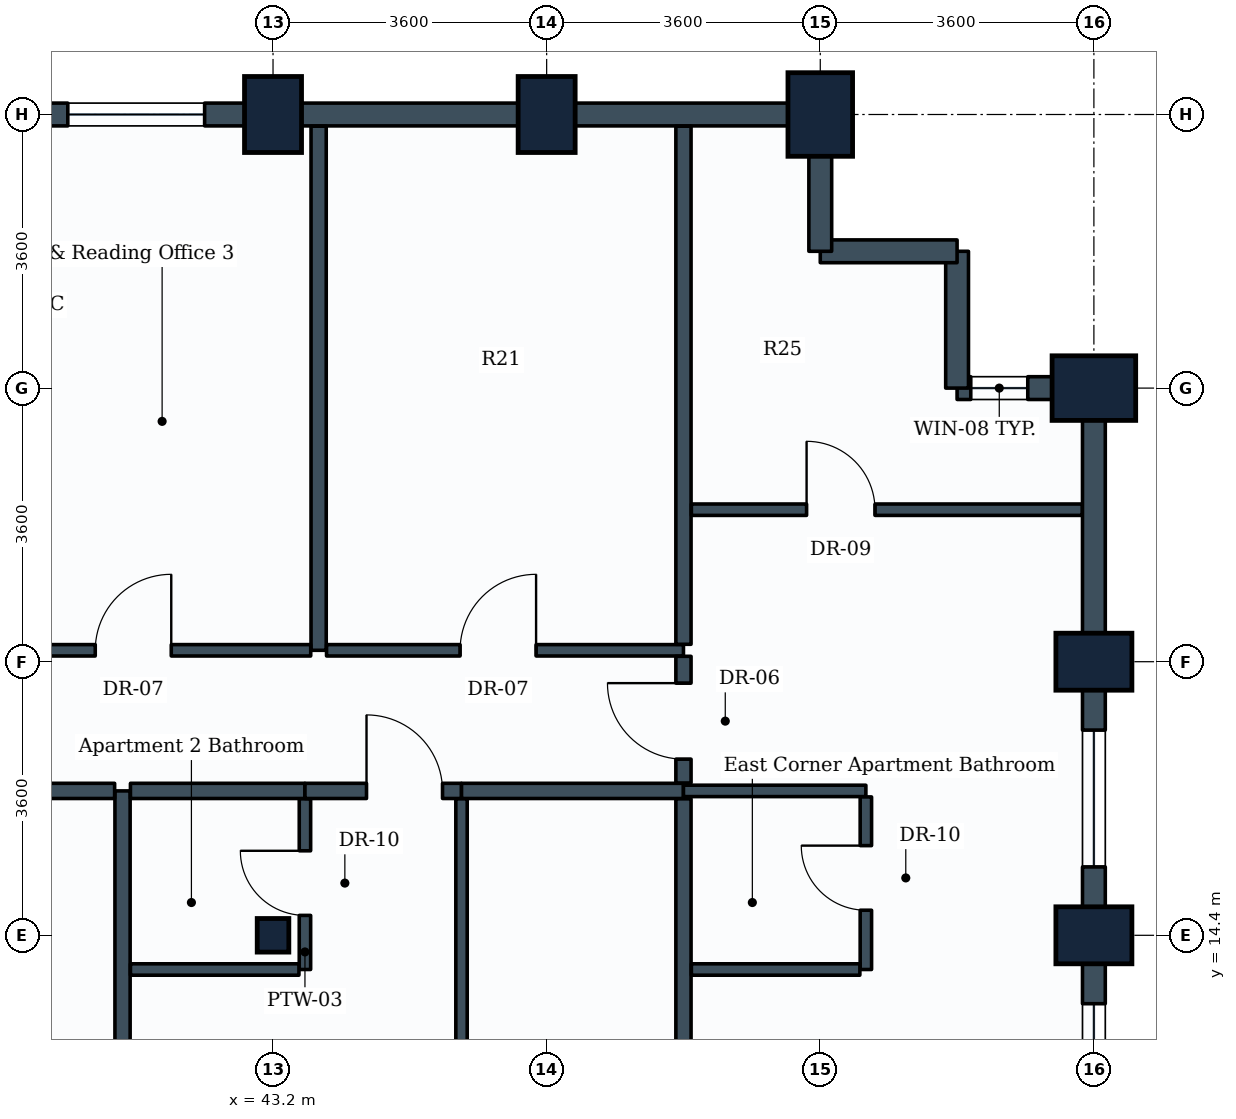
"""IFC4 building model, lengths in metres.
Left out: names, types, materials, properties, quantities, classifications, styles, units other than length and angle.
Written with IfcOpenShell. Run it as: python <this file> out.ifc"""

import sys

from ifc_helpers import new_model, si_unit, direction, frame, frame_2d, origin, origin_2d, place, context, subcontext, project, spatial, rectangle, i_section, extrude, element, fill, save


model = new_model("IFC4")
c1 = context("Model", 3, precision=1e-05, world=origin(), true_north=direction((0.0, 1.0)))
c2 = subcontext(c1, "Body", "Model", "MODEL_VIEW")
j1 = project(units=[si_unit("LENGTHUNIT", "METRE"), si_unit("PLANEANGLEUNIT", "RADIAN")], contexts=[c1])
p1 = place(None, origin())
s1 = spatial("IfcSite", under=j1, at=p1, CompositionType="ELEMENT")
p2 = place(p1, origin())
s2 = spatial("IfcBuilding", under=s1, at=p2, CompositionType="ELEMENT")
p3 = place(p2, frame((0.0, 0.0, 135.2)))
s3 = spatial("IfcBuildingStorey", under=s2, at=p3, CompositionType="ELEMENT", Elevation=135.2)
p4 = place(p3, frame((43.2, 14.4, 0.0), z_axis=(0.0, 0.0, 1.0), x_axis=(1.0, 0.0, 0.0)))
e1 = element("IfcColumn", 1, at=p4, inside=s3, PredefinedType="COLUMN", context=c2, shape_type="SweptSolid", body=[
    extrude(i_section(OverallWidth=0.416, OverallDepth=0.442, WebThickness=0.025, FlangeThickness=0.041, FilletRadius=0.015, at=origin_2d()), origin(), (0.0, 0.0, 1.0), 3.8),
])
for number, where, z_axis, x_axis in (
    (2, (43.2, 25.2, 0.0), (0.0, 0.0, 1.0), (1.0, 0.0, 0.0)),
    (3, (46.8, 25.2, 0.0), (0.0, 0.0, 1.0), (1.0, 0.0, 0.0)),
):
    element("IfcColumn", number, at=place(p3, frame(where, z_axis=z_axis, x_axis=x_axis)), inside=s3, PredefinedType="COLUMN", context=c2, shape_type="SweptSolid", body=[
        extrude(rectangle(XDim=0.75, YDim=1.0, at=origin_2d()), origin(), (0.0, 0.0, 1.0), 3.8),
    ])
p5 = place(p3, frame((50.4, 25.2, 0.0), z_axis=(0.0, 0.0, 1.0), x_axis=(1.0, 0.0, 0.0)))
e4 = element("IfcColumn", 4, at=p5, inside=s3, PredefinedType="COLUMN", context=c2, shape_type="SweptSolid", body=[
    extrude(rectangle(XDim=0.85, YDim=1.1, at=origin_2d()), origin(), (0.0, 0.0, 1.0), 3.8),
])
for number, where, z_axis, x_axis in (
    (5, (54.0, 14.4, 0.0), (0.0, 0.0, 1.0), (0.0, 1.0, 0.0)),
    (6, (54.0, 18.0, 0.0), (0.0, 0.0, 1.0), (0.0, 1.0, 0.0)),
):
    element("IfcColumn", number, at=place(p3, frame(where, z_axis=z_axis, x_axis=x_axis)), inside=s3, PredefinedType="COLUMN", context=c2, shape_type="SweptSolid", body=[
        extrude(rectangle(XDim=0.75, YDim=1.0, at=origin_2d()), origin(), (0.0, 0.0, 1.0), 3.8),
    ])
p6 = place(p3, frame((54.0, 21.6, 0.0), z_axis=(0.0, 0.0, 1.0), x_axis=(0.0, 1.0, 0.0)))
e7 = element("IfcColumn", 7, at=p6, inside=s3, PredefinedType="COLUMN", context=c2, shape_type="SweptSolid", body=[
    extrude(rectangle(XDim=0.85, YDim=1.1, at=origin_2d()), origin(), (0.0, 0.0, 1.0), 3.8),
])
p7 = place(p3, frame((54.0, 14.4, 0.0), z_axis=(0.0, 0.0, 1.0), x_axis=(0.0, -1.0, 0.0)))
e8 = element("IfcWall", 8, at=p7, inside=s3, PredefinedType="STANDARD", context=c2, shape_type="SweptSolid", body=[
    extrude(rectangle(XDim=3.6, YDim=0.3, at=frame_2d((1.8, 0.0))), origin(), (0.0, 0.0, 1.0), 2.93),
])
p8 = place(p7, frame((0.9, 0.0, 0.85)))
e9 = element("IfcOpeningElement", 9, at=p8, cuts=e8, PredefinedType="OPENING", context=c2, shape_type="SweptSolid", body=[
    extrude(rectangle(XDim=1.8, YDim=1.35, at=frame_2d((0.9, 0.675))), frame((0.0, 0.16, 0.0), z_axis=(0.0, -1.0, 0.0), x_axis=(1.0, 0.0, 0.0)), (0.0, 0.0, 1.0), 0.32),
])
p9 = place(p3, frame((54.0, 18.0, 0.0), z_axis=(0.0, 0.0, 1.0), x_axis=(0.0, -1.0, 0.0)))
e10 = element("IfcWall", 10, at=p9, inside=s3, PredefinedType="STANDARD", context=c2, shape_type="SweptSolid", body=[
    extrude(rectangle(XDim=3.6, YDim=0.3, at=frame_2d((1.8, 0.0))), origin(), (0.0, 0.0, 1.0), 2.93),
])
p10 = place(p9, frame((0.9, 0.0, 0.85)))
e11 = element("IfcOpeningElement", 11, at=p10, cuts=e10, PredefinedType="OPENING", context=c2, shape_type="SweptSolid", body=[
    extrude(rectangle(XDim=1.8, YDim=1.35, at=frame_2d((0.9, 0.675))), frame((0.0, 0.16, 0.0), z_axis=(0.0, -1.0, 0.0), x_axis=(1.0, 0.0, 0.0)), (0.0, 0.0, 1.0), 0.32),
])
p11 = place(p3, frame((54.0, 21.6, 0.0), z_axis=(0.0, 0.0, 1.0), x_axis=(0.0, -1.0, 0.0)))
e12 = element("IfcWall", 12, at=p11, inside=s3, PredefinedType="STANDARD", context=c2, shape_type="SweptSolid", body=[
    extrude(rectangle(XDim=3.6, YDim=0.3, at=frame_2d((1.8, 0.0))), origin(), (0.0, 0.0, 1.0), 2.93),
])
p12 = place(p3, frame((52.2, 21.6, 0.0), z_axis=(0.0, 0.0, 1.0), x_axis=(1.0, 0.0, 0.0)))
e13 = element("IfcWall", 13, at=p12, inside=s3, PredefinedType="STANDARD", context=c2, shape_type="SweptSolid", body=[
    extrude(rectangle(XDim=1.8, YDim=0.3, at=frame_2d((0.9, 0.0))), origin(), (0.0, 0.0, 1.0), 2.93),
])
p13 = place(p12, frame((0.18, 0.0, 0.85)))
e14 = element("IfcOpeningElement", 14, at=p13, cuts=e13, PredefinedType="OPENING", context=c2, shape_type="SweptSolid", body=[
    extrude(rectangle(XDim=0.75, YDim=1.05, at=frame_2d((0.375, 0.525))), frame((0.0, 0.16, 0.0), z_axis=(0.0, -1.0, 0.0), x_axis=(1.0, 0.0, 0.0)), (0.0, 0.0, 1.0), 0.32),
])
p14 = place(p3, frame((52.2, 23.4, 0.0), z_axis=(0.0, 0.0, 1.0), x_axis=(0.0, -1.0, 0.0)))
e15 = element("IfcWall", 15, at=p14, inside=s3, PredefinedType="STANDARD", context=c2, shape_type="SweptSolid", body=[
    extrude(rectangle(XDim=1.8, YDim=0.3, at=frame_2d((0.9, 0.0))), origin(), (0.0, 0.0, 1.0), 3.535),
])
p15 = place(p3, frame((50.4, 23.4, 0.0), z_axis=(0.0, 0.0, 1.0), x_axis=(1.0, 0.0, 0.0)))
e16 = element("IfcWall", 16, at=p15, inside=s3, PredefinedType="STANDARD", context=c2, shape_type="SweptSolid", body=[
    extrude(rectangle(XDim=1.8, YDim=0.3, at=frame_2d((0.9, 0.0))), origin(), (0.0, 0.0, 1.0), 3.535),
])
p16 = place(p3, frame((50.4, 25.2, 0.0), z_axis=(0.0, 0.0, 1.0), x_axis=(0.0, -1.0, 0.0)))
e17 = element("IfcWall", 17, at=p16, inside=s3, PredefinedType="STANDARD", context=c2, shape_type="SweptSolid", body=[
    extrude(rectangle(XDim=1.8, YDim=0.3, at=frame_2d((0.9, 0.0))), origin(), (0.0, 0.0, 1.0), 2.93),
])
p17 = place(p3, frame((46.8, 25.2, 0.0), z_axis=(0.0, 0.0, 1.0), x_axis=(1.0, 0.0, 0.0)))
e18 = element("IfcWall", 18, at=p17, inside=s3, PredefinedType="STANDARD", context=c2, shape_type="SweptSolid", body=[
    extrude(rectangle(XDim=3.6, YDim=0.3, at=frame_2d((1.8, 0.0))), origin(), (0.0, 0.0, 1.0), 2.93),
])
p18 = place(p3, frame((43.2, 25.2, 0.0), z_axis=(0.0, 0.0, 1.0), x_axis=(1.0, 0.0, 0.0)))
e19 = element("IfcWall", 19, at=p18, inside=s3, PredefinedType="STANDARD", context=c2, shape_type="SweptSolid", body=[
    extrude(rectangle(XDim=3.6, YDim=0.3, at=frame_2d((1.8, 0.0))), origin(), (0.0, 0.0, 1.0), 2.93),
])
p19 = place(p3, frame((39.6, 25.2, 0.0), z_axis=(0.0, 0.0, 1.0), x_axis=(1.0, 0.0, 0.0)))
e20 = element("IfcWall", 20, at=p19, inside=s3, PredefinedType="STANDARD", context=c2, shape_type="SweptSolid", body=[
    extrude(rectangle(XDim=3.6, YDim=0.3, at=frame_2d((1.8, 0.0))), origin(), (0.0, 0.0, 1.0), 2.93),
])
p20 = place(p19, frame((0.9, 0.0, 0.85)))
e21 = element("IfcOpeningElement", 21, at=p20, cuts=e20, PredefinedType="OPENING", context=c2, shape_type="SweptSolid", body=[
    extrude(rectangle(XDim=1.8, YDim=1.35, at=frame_2d((0.9, 0.675))), frame((0.0, 0.16, 0.0), z_axis=(0.0, -1.0, 0.0), x_axis=(1.0, 0.0, 0.0)), (0.0, 0.0, 1.0), 0.32),
])
p21 = place(p3, frame((41.22, 5.7, 0.0), z_axis=(0.0, 0.0, 1.0), x_axis=(0.0, 1.0, 0.0)))
e22 = element("IfcWall", 22, at=p21, inside=s3, PredefinedType="PARTITIONING", context=c2, shape_type="SweptSolid", body=[
    extrude(rectangle(XDim=10.6, YDim=0.2, at=frame_2d((5.3, 0.0))), origin(), (0.0, 0.0, 1.0), 3.13),
])
p22 = place(p3, frame((36.8, 16.3, 0.0), z_axis=(0.0, 0.0, 1.0), x_axis=(1.0, 0.0, 0.0)))
e23 = element("IfcWall", 23, at=p22, inside=s3, PredefinedType="PARTITIONING", context=c2, shape_type="SweptSolid", body=[
    extrude(rectangle(XDim=4.316, YDim=0.2, at=frame_2d((2.158, 0.0))), origin(), (0.0, 0.0, 1.0), 3.17),
])
p23 = place(p22, frame((1.71, 0.0, 0.0)))
e24 = element("IfcOpeningElement", 24, at=p23, cuts=e23, PredefinedType="OPENING", context=c2, shape_type="SweptSolid", body=[
    extrude(rectangle(XDim=1.0, YDim=2.1, at=frame_2d((0.5, 1.05))), frame((0.0, 0.11, 0.0), z_axis=(0.0, -1.0, 0.0), x_axis=(1.0, 0.0, 0.0)), (0.0, 0.0, 1.0), 0.22),
])
p24 = place(p3, frame((41.324, 16.3, 0.0), z_axis=(0.0, 0.0, 1.0), x_axis=(1.0, 0.0, 0.0)))
e25 = element("IfcWall", 25, at=p24, inside=s3, PredefinedType="PARTITIONING", context=c2, shape_type="SweptSolid", body=[
    extrude(rectangle(XDim=2.296, YDim=0.2, at=frame_2d((1.148, 0.0))), origin(), (0.0, 0.0, 1.0), 3.18),
])
p25 = place(p3, frame((43.62, 13.95, 0.0), z_axis=(0.0, 0.0, 1.0), x_axis=(0.0, 1.0, 0.0)))
e26 = element("IfcWall", 26, at=p25, inside=s3, PredefinedType="PARTITIONING", context=c2, shape_type="SweptSolid", body=[
    extrude(rectangle(XDim=2.246, YDim=0.15, at=frame_2d((1.123, 0.0))), origin(), (0.0, 0.0, 1.0), 3.17),
])
p26 = place(p25, frame((0.712, 0.0, 0.0)))
e27 = element("IfcOpeningElement", 27, at=p26, cuts=e26, PredefinedType="OPENING", context=c2, shape_type="SweptSolid", body=[
    extrude(rectangle(XDim=0.85, YDim=2.1, at=frame_2d((0.425, 1.05))), frame((0.0, 0.085, 0.0), z_axis=(0.0, -1.0, 0.0), x_axis=(1.0, 0.0, 0.0)), (0.0, 0.0, 1.0), 0.17),
])
p27 = place(p3, frame((41.324, 13.95, 0.0), z_axis=(0.0, 0.0, 1.0), x_axis=(1.0, 0.0, 0.0)))
e28 = element("IfcWall", 28, at=p27, inside=s3, PredefinedType="PARTITIONING", context=c2, shape_type="SweptSolid", body=[
    extrude(rectangle(XDim=2.217, YDim=0.15, at=frame_2d((1.108, 0.0))), origin(), (0.0, 0.0, 1.0), 3.18),
])
p28 = place(p3, frame((43.62, 16.3, 0.0), z_axis=(0.0, 0.0, 1.0), x_axis=(1.0, 0.0, 0.0)))
e29 = element("IfcWall", 29, at=p28, inside=s3, PredefinedType="PARTITIONING", context=c2, shape_type="SweptSolid", body=[
    extrude(rectangle(XDim=2.06, YDim=0.2, at=frame_2d((1.03, 0.0))), origin(), (0.0, 0.0, 1.0), 3.535),
])
p29 = place(p28, frame((0.81, 0.0, 0.0)))
e30 = element("IfcOpeningElement", 30, at=p29, cuts=e29, PredefinedType="OPENING", context=c2, shape_type="SweptSolid", body=[
    extrude(rectangle(XDim=1.0, YDim=2.1, at=frame_2d((0.5, 1.05))), frame((0.0, 0.11, 0.0), z_axis=(0.0, -1.0, 0.0), x_axis=(1.0, 0.0, 0.0)), (0.0, 0.0, 1.0), 0.22),
])
p30 = place(p3, frame((45.68, 16.3, 0.0), z_axis=(0.0, 0.0, 1.0), x_axis=(1.0, 0.0, 0.0)))
e31 = element("IfcWall", 31, at=p30, inside=s3, PredefinedType="PARTITIONING", context=c2, shape_type="SweptSolid", body=[
    extrude(rectangle(XDim=2.92, YDim=0.2, at=frame_2d((1.46, 0.0))), origin(), (0.0, 0.0, 1.0), 3.17),
])
p31 = place(p3, frame((45.68, 5.7, 0.0), z_axis=(0.0, 0.0, 1.0), x_axis=(0.0, 1.0, 0.0)))
e32 = element("IfcWall", 32, at=p31, inside=s3, PredefinedType="PARTITIONING", context=c2, shape_type="SweptSolid", body=[
    extrude(rectangle(XDim=10.496, YDim=0.15, at=frame_2d((5.248, 0.0))), origin(), (0.0, 0.0, 1.0), 3.17),
])
p32 = place(p31, frame((4.81, 0.0, 0.0)))
e33 = element("IfcOpeningElement", 33, at=p32, cuts=e32, PredefinedType="OPENING", context=c2, shape_type="SweptSolid", body=[
    extrude(rectangle(XDim=0.9, YDim=2.1, at=frame_2d((0.45, 1.05))), frame((0.0, 0.085, 0.0), z_axis=(0.0, -1.0, 0.0), x_axis=(1.0, 0.0, 0.0)), (0.0, 0.0, 1.0), 0.17),
])
p33 = place(p3, frame((43.8, 18.15, 0.0), z_axis=(0.0, 0.0, 1.0), x_axis=(0.0, 1.0, 0.0)))
e34 = element("IfcWall", 34, at=p33, inside=s3, PredefinedType="PARTITIONING", context=c2, shape_type="SweptSolid", body=[
    extrude(rectangle(XDim=6.896, YDim=0.2, at=frame_2d((3.448, 0.0))), origin(), (0.0, 0.0, 1.0), 2.93),
])
p34 = place(p3, frame((39.0, 18.15, 0.0), z_axis=(0.0, 0.0, 1.0), x_axis=(1.0, 0.0, 0.0)))
e35 = element("IfcWall", 35, at=p34, inside=s3, PredefinedType="PARTITIONING", context=c2, shape_type="SweptSolid", body=[
    extrude(rectangle(XDim=4.696, YDim=0.15, at=frame_2d((2.348, 0.0))), origin(), (0.0, 0.0, 1.0), 3.08),
])
p35 = place(p34, frame((1.861, 0.0, 0.0)))
e36 = element("IfcOpeningElement", 36, at=p35, cuts=e35, PredefinedType="OPENING", context=c2, shape_type="SweptSolid", body=[
    extrude(rectangle(XDim=1.0, YDim=2.1, at=frame_2d((0.5, 1.05))), frame((0.0, 0.085, 0.0), z_axis=(0.0, -1.0, 0.0), x_axis=(1.0, 0.0, 0.0)), (0.0, 0.0, 1.0), 0.17),
])
p36 = place(p3, frame((43.904, 18.15, 0.0), z_axis=(0.0, 0.0, 1.0), x_axis=(1.0, 0.0, 0.0)))
e37 = element("IfcWall", 37, at=p36, inside=s3, PredefinedType="PARTITIONING", context=c2, shape_type="SweptSolid", body=[
    extrude(rectangle(XDim=4.696, YDim=0.15, at=frame_2d((2.348, 0.0))), origin(), (0.0, 0.0, 1.0), 3.17),
])
p37 = place(p36, frame((1.757, 0.0, 0.0)))
e38 = element("IfcOpeningElement", 38, at=p37, cuts=e37, PredefinedType="OPENING", context=c2, shape_type="SweptSolid", body=[
    extrude(rectangle(XDim=1.0, YDim=2.1, at=frame_2d((0.5, 1.05))), frame((0.0, 0.085, 0.0), z_axis=(0.0, -1.0, 0.0), x_axis=(1.0, 0.0, 0.0)), (0.0, 0.0, 1.0), 0.17),
])
p38 = place(p3, frame((48.6, 5.7, 0.0), z_axis=(0.0, 0.0, 1.0), x_axis=(0.0, 1.0, 0.0)))
e39 = element("IfcWall", 39, at=p38, inside=s3, PredefinedType="PARTITIONING", context=c2, shape_type="SweptSolid", body=[
    extrude(rectangle(XDim=10.496, YDim=0.2, at=frame_2d((5.248, 0.0))), origin(), (0.0, 0.0, 1.0), 3.17),
])
p39 = place(p3, frame((48.6, 18.229, 0.0), z_axis=(0.0, 0.0, 1.0), x_axis=(0.0, 1.0, 0.0)))
e40 = element("IfcWall", 40, at=p39, inside=s3, PredefinedType="PARTITIONING", context=c2, shape_type="SweptSolid", body=[
    extrude(rectangle(XDim=6.817, YDim=0.2, at=frame_2d((3.408, 0.0))), origin(), (0.0, 0.0, 1.0), 2.93),
])
p40 = place(p3, frame((48.6, 16.404, 0.0), z_axis=(0.0, 0.0, 1.0), x_axis=(0.0, 1.0, 0.0)))
e41 = element("IfcWall", 41, at=p40, inside=s3, PredefinedType="PARTITIONING", context=c2, shape_type="SweptSolid", body=[
    extrude(rectangle(XDim=1.667, YDim=0.2, at=frame_2d((0.833, 0.0))), origin(), (0.0, 0.0, 1.0), 3.535),
])
p41 = place(p40, frame((0.314, 0.0, 0.0)))
e42 = element("IfcOpeningElement", 42, at=p41, cuts=e41, PredefinedType="OPENING", context=c2, shape_type="SweptSolid", body=[
    extrude(rectangle(XDim=1.0, YDim=2.1, at=frame_2d((0.5, 1.05))), frame((0.0, 0.11, 0.0), z_axis=(0.0, -1.0, 0.0), x_axis=(1.0, 0.0, 0.0)), (0.0, 0.0, 1.0), 0.22),
])
p42 = place(p3, frame((48.6, 16.3, 0.0), z_axis=(0.0, 0.0, 1.0), x_axis=(1.0, 0.0, 0.0)))
e43 = element("IfcWall", 43, at=p42, inside=s3, PredefinedType="PARTITIONING", context=c2, shape_type="SweptSolid", body=[
    extrude(rectangle(XDim=2.4, YDim=0.15, at=frame_2d((1.2, 0.0))), origin(), (0.0, 0.0, 1.0), 3.535),
])
p43 = place(p3, frame((51.0, 13.95, 0.0), z_axis=(0.0, 0.0, 1.0), x_axis=(0.0, 1.0, 0.0)))
e44 = element("IfcWall", 44, at=p43, inside=s3, PredefinedType="PARTITIONING", context=c2, shape_type="SweptSolid", body=[
    extrude(rectangle(XDim=2.271, YDim=0.15, at=frame_2d((1.135, 0.0))), origin(), (0.0, 0.0, 1.0), 3.17),
])
p44 = place(p43, frame((0.78, 0.0, 0.0)))
e45 = element("IfcOpeningElement", 45, at=p44, cuts=e44, PredefinedType="OPENING", context=c2, shape_type="SweptSolid", body=[
    extrude(rectangle(XDim=0.85, YDim=2.1, at=frame_2d((0.425, 1.05))), frame((0.0, 0.085, 0.0), z_axis=(0.0, -1.0, 0.0), x_axis=(1.0, 0.0, 0.0)), (0.0, 0.0, 1.0), 0.17),
])
p45 = place(p3, frame((48.704, 13.95, 0.0), z_axis=(0.0, 0.0, 1.0), x_axis=(1.0, 0.0, 0.0)))
e46 = element("IfcWall", 46, at=p45, inside=s3, PredefinedType="PARTITIONING", context=c2, shape_type="SweptSolid", body=[
    extrude(rectangle(XDim=2.217, YDim=0.15, at=frame_2d((1.108, 0.0))), origin(), (0.0, 0.0, 1.0), 3.535),
])
p46 = place(p3, frame((48.704, 20.0, 0.0), z_axis=(0.0, 0.0, 1.0), x_axis=(1.0, 0.0, 0.0)))
e47 = element("IfcWall", 47, at=p46, inside=s3, PredefinedType="PARTITIONING", context=c2, shape_type="SweptSolid", body=[
    extrude(rectangle(XDim=5.142, YDim=0.15, at=frame_2d((2.571, 0.0))), origin(), (0.0, 0.0, 1.0), 2.93),
])
p47 = place(p46, frame((1.516, 0.0, 0.0)))
e48 = element("IfcOpeningElement", 48, at=p47, cuts=e47, PredefinedType="OPENING", context=c2, shape_type="SweptSolid", body=[
    extrude(rectangle(XDim=0.9, YDim=2.1, at=frame_2d((0.45, 1.05))), frame((0.0, 0.085, 0.0), z_axis=(0.0, -1.0, 0.0), x_axis=(1.0, 0.0, 0.0)), (0.0, 0.0, 1.0), 0.17),
])
p48 = place(p8, origin())
e49 = element("IfcWindow", 49, at=p48, inside=s3, PartitioningType="SINGLE_PANEL", PredefinedType="WINDOW", context=c2, shape_type="SweptSolid", body=[
    extrude(rectangle(XDim=1.8, YDim=1.35, at=frame_2d((0.9, 0.675))), frame((0.0, 0.03, 0.0), z_axis=(0.0, -1.0, 0.0), x_axis=(1.0, 0.0, 0.0)), (0.0, 0.0, 1.0), 0.06),
])
fill(e9, e49)
p49 = place(p10, origin())
e50 = element("IfcWindow", 50, at=p49, inside=s3, PartitioningType="SINGLE_PANEL", PredefinedType="WINDOW", context=c2, shape_type="SweptSolid", body=[
    extrude(rectangle(XDim=1.8, YDim=1.35, at=frame_2d((0.9, 0.675))), frame((0.0, 0.03, 0.0), z_axis=(0.0, -1.0, 0.0), x_axis=(1.0, 0.0, 0.0)), (0.0, 0.0, 1.0), 0.06),
])
fill(e11, e50)
p50 = place(p20, origin())
e51 = element("IfcWindow", 51, at=p50, inside=s3, PartitioningType="SINGLE_PANEL", PredefinedType="WINDOW", context=c2, shape_type="SweptSolid", body=[
    extrude(rectangle(XDim=1.8, YDim=1.35, at=frame_2d((0.9, 0.675))), frame((0.0, 0.03, 0.0), z_axis=(0.0, -1.0, 0.0), x_axis=(1.0, 0.0, 0.0)), (0.0, 0.0, 1.0), 0.06),
])
fill(e21, e51)
p51 = place(p26, origin())
e52 = element("IfcDoor", 52, at=p51, inside=s3, OperationType="SINGLE_SWING_RIGHT", PredefinedType="DOOR", context=c2, shape_type="SweptSolid", body=[
    extrude(rectangle(XDim=0.85, YDim=2.1, at=frame_2d((0.425, 1.05))), frame((0.0, 0.025, 0.0), z_axis=(0.0, -1.0, 0.0), x_axis=(1.0, 0.0, 0.0)), (0.0, 0.0, 1.0), 0.05),
])
fill(e27, e52)
p52 = place(p29, origin())
e53 = element("IfcDoor", 53, at=p52, inside=s3, OperationType="SINGLE_SWING_LEFT", PredefinedType="DOOR", context=c2, shape_type="SweptSolid", body=[
    extrude(rectangle(XDim=1.0, YDim=2.1, at=frame_2d((0.5, 1.05))), frame((0.0, 0.025, 0.0), z_axis=(0.0, -1.0, 0.0), x_axis=(1.0, 0.0, 0.0)), (0.0, 0.0, 1.0), 0.05),
])
fill(e30, e53)
p53 = place(p35, origin())
e54 = element("IfcDoor", 54, at=p53, inside=s3, OperationType="SINGLE_SWING_RIGHT", PredefinedType="DOOR", context=c2, shape_type="SweptSolid", body=[
    extrude(rectangle(XDim=1.0, YDim=2.1, at=frame_2d((0.5, 1.05))), frame((0.0, 0.025, 0.0), z_axis=(0.0, -1.0, 0.0), x_axis=(1.0, 0.0, 0.0)), (0.0, 0.0, 1.0), 0.05),
])
fill(e36, e54)
p54 = place(p37, origin())
e55 = element("IfcDoor", 55, at=p54, inside=s3, OperationType="SINGLE_SWING_RIGHT", PredefinedType="DOOR", context=c2, shape_type="SweptSolid", body=[
    extrude(rectangle(XDim=1.0, YDim=2.1, at=frame_2d((0.5, 1.05))), frame((0.0, 0.025, 0.0), z_axis=(0.0, -1.0, 0.0), x_axis=(1.0, 0.0, 0.0)), (0.0, 0.0, 1.0), 0.05),
])
fill(e38, e55)
p55 = place(p41, origin())
e56 = element("IfcDoor", 56, at=p55, inside=s3, OperationType="SINGLE_SWING_RIGHT", PredefinedType="DOOR", context=c2, shape_type="SweptSolid", body=[
    extrude(rectangle(XDim=1.0, YDim=2.1, at=frame_2d((0.5, 1.05))), frame((0.0, 0.025, 0.0), z_axis=(0.0, -1.0, 0.0), x_axis=(1.0, 0.0, 0.0)), (0.0, 0.0, 1.0), 0.05),
])
fill(e42, e56)
p56 = place(p44, origin())
e57 = element("IfcDoor", 57, at=p56, inside=s3, OperationType="SINGLE_SWING_RIGHT", PredefinedType="DOOR", context=c2, shape_type="SweptSolid", body=[
    extrude(rectangle(XDim=0.85, YDim=2.1, at=frame_2d((0.425, 1.05))), frame((0.0, 0.025, 0.0), z_axis=(0.0, -1.0, 0.0), x_axis=(1.0, 0.0, 0.0)), (0.0, 0.0, 1.0), 0.05),
])
fill(e45, e57)
p57 = place(p47, origin())
e58 = element("IfcDoor", 58, at=p57, inside=s3, OperationType="SINGLE_SWING_LEFT", PredefinedType="DOOR", context=c2, shape_type="SweptSolid", body=[
    extrude(rectangle(XDim=0.9, YDim=2.1, at=frame_2d((0.45, 1.05))), frame((0.0, 0.025, 0.0), z_axis=(0.0, -1.0, 0.0), x_axis=(1.0, 0.0, 0.0)), (0.0, 0.0, 1.0), 0.05),
])
fill(e48, e58)
p58 = place(p13, origin())
e59 = element("IfcWindow", 59, at=p58, inside=s3, PartitioningType="SINGLE_PANEL", PredefinedType="WINDOW", context=c2, shape_type="SweptSolid", body=[
    extrude(rectangle(XDim=0.75, YDim=1.05, at=frame_2d((0.375, 0.525))), frame((0.0, 0.03, 0.0), z_axis=(0.0, -1.0, 0.0), x_axis=(1.0, 0.0, 0.0)), (0.0, 0.0, 1.0), 0.06),
])
fill(e14, e59)
save(model, sys.argv[1])
